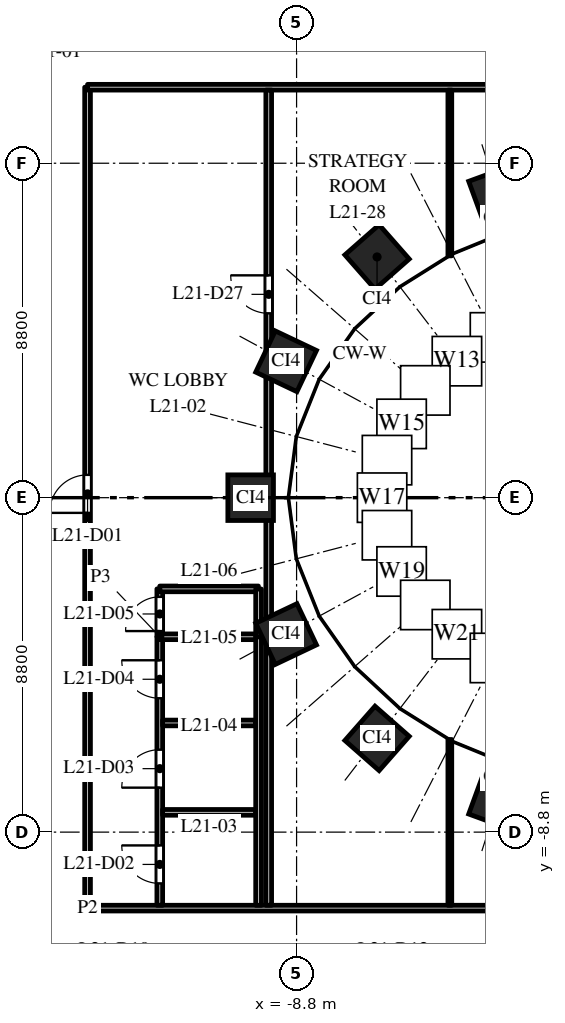
"""IFC4 building model, lengths in metres.
Left out: names, types, materials, properties, quantities, classifications, styles, units other than length and angle.
Written with IfcOpenShell. Run it as: python <this file> out.ifc"""

import sys

from ifc_helpers import new_model, si_unit, direction, frame, frame_2d, origin, origin_2d, place, context, subcontext, project, spatial, rectangle, extrude, element, fill, save


model = new_model("IFC4")
c1 = context("Model", 3, precision=1e-05, world=origin(), true_north=direction((0.0, 1.0)))
c2 = subcontext(c1, "Body", "Model", "MODEL_VIEW")
j1 = project(units=[si_unit("LENGTHUNIT", "METRE"), si_unit("PLANEANGLEUNIT", "RADIAN")], contexts=[c1])
p1 = place(None, origin())
s1 = spatial("IfcSite", under=j1, at=p1, CompositionType="ELEMENT")
p2 = place(p1, origin())
s2 = spatial("IfcBuilding", under=s1, at=p2, CompositionType="ELEMENT")
p3 = place(p2, frame((0.0, 0.0, 96.0)))
s3 = spatial("IfcBuildingStorey", under=s2, at=p3, CompositionType="ELEMENT", Elevation=96.0)
for number, where, z_axis, x_axis in (
    (1, (-3.501, 7.967, 0.0), (0.0, 0.0, 1.0), (-0.939, -0.344, 0.0)),
    (2, (-6.682, 6.334, 0.0), (0.0, 0.0, 1.0), (-0.751, -0.66, 0.0)),
    (3, (-9.076, 3.588, 0.0), (0.0, 0.0, 1.0), (-0.429, -0.903, 0.0)),
    (4, (-10.008, 0.0, 0.0), (0.0, 0.0, 1.0), (0.0, -1.0, 0.0)),
    (5, (-9.076, -3.588, 0.0), (0.0, 0.0, 1.0), (0.429, -0.903, 0.0)),
    (6, (-6.682, -6.334, 0.0), (0.0, 0.0, 1.0), (0.751, -0.66, 0.0)),
    (7, (-3.501, -7.967, 0.0), (0.0, 0.0, 1.0), (0.939, -0.344, 0.0)),
):
    element("IfcColumn", number, at=place(p3, frame(where, z_axis=z_axis, x_axis=x_axis)), inside=s3, PredefinedType="COLUMN", context=c2, shape_type="SweptSolid", body=[
        extrude(rectangle(XDim=1.2, YDim=1.2, at=origin_2d()), origin(), (0.0, 0.0, 1.0), 4.0),
    ])
p4 = place(p3, frame((-14.3, -10.8, 0.0), z_axis=(0.0, 0.0, 1.0), x_axis=(0.0, 1.0, 0.0)))
e8 = element("IfcWall", 8, at=p4, inside=s3, PredefinedType="PARTITIONING", context=c2, shape_type="SweptSolid", body=[
    extrude(rectangle(XDim=21.6, YDim=0.15, at=frame_2d((10.8, 0.0))), origin(), (0.0, 0.0, 1.0), 2.75),
])
p5 = place(p4, frame((10.4, 0.0, 0.0)))
e9 = element("IfcOpeningElement", 9, at=p5, cuts=e8, PredefinedType="OPENING", context=c2, shape_type="SweptSolid", body=[
    extrude(rectangle(XDim=1.0, YDim=2.1, at=frame_2d((0.5, 1.05))), frame((0.0, 0.085, 0.0), z_axis=(0.0, -1.0, 0.0), x_axis=(1.0, 0.0, 0.0)), (0.0, 0.0, 1.0), 0.17),
])
p6 = place(p3, frame((-14.3, -10.8, 0.0), z_axis=(0.0, 0.0, 1.0), x_axis=(1.0, 0.0, 0.0)))
e10 = element("IfcWall", 10, at=p6, inside=s3, PredefinedType="PARTITIONING", context=c2, shape_type="SweptSolid", body=[
    extrude(rectangle(XDim=28.6, YDim=0.15, at=frame_2d((14.3, 0.0))), origin(), (0.0, 0.0, 1.0), 2.85),
])
p7 = place(p6, frame((11.4, 0.0, 0.0)))
e11 = element("IfcOpeningElement", 11, at=p7, cuts=e10, PredefinedType="OPENING", context=c2, shape_type="SweptSolid", body=[
    extrude(rectangle(XDim=1.0, YDim=2.1, at=frame_2d((0.5, 1.05))), frame((0.0, 0.085, 0.0), z_axis=(0.0, -1.0, 0.0), x_axis=(1.0, 0.0, 0.0)), (0.0, 0.0, 1.0), 0.17),
])
p8 = place(p6, frame((16.167, 0.0, 0.0)))
e12 = element("IfcOpeningElement", 12, at=p8, cuts=e10, PredefinedType="OPENING", context=c2, shape_type="SweptSolid", body=[
    extrude(rectangle(XDim=1.0, YDim=2.1, at=frame_2d((0.5, 1.05))), frame((0.0, 0.085, 0.0), z_axis=(0.0, -1.0, 0.0), x_axis=(1.0, 0.0, 0.0)), (0.0, 0.0, 1.0), 0.17),
])
p9 = place(p3, frame((-14.3, 10.8, 0.0), z_axis=(0.0, 0.0, 1.0), x_axis=(1.0, 0.0, 0.0)))
e13 = element("IfcWall", 13, at=p9, inside=s3, PredefinedType="PARTITIONING", context=c2, shape_type="SweptSolid", body=[
    extrude(rectangle(XDim=28.6, YDim=0.15, at=frame_2d((14.3, 0.0))), origin(), (0.0, 0.0, 1.0), 2.85),
])
p10 = place(p9, frame((11.433, 0.0, 0.0)))
e14 = element("IfcOpeningElement", 14, at=p10, cuts=e13, PredefinedType="OPENING", context=c2, shape_type="SweptSolid", body=[
    extrude(rectangle(XDim=1.0, YDim=2.1, at=frame_2d((0.5, 1.05))), frame((0.0, 0.085, 0.0), z_axis=(0.0, -1.0, 0.0), x_axis=(1.0, 0.0, 0.0)), (0.0, 0.0, 1.0), 0.17),
])
p11 = place(p9, frame((16.2, 0.0, 0.0)))
e15 = element("IfcOpeningElement", 15, at=p11, cuts=e13, PredefinedType="OPENING", context=c2, shape_type="SweptSolid", body=[
    extrude(rectangle(XDim=1.0, YDim=2.1, at=frame_2d((0.5, 1.05))), frame((0.0, 0.085, 0.0), z_axis=(0.0, -1.0, 0.0), x_axis=(1.0, 0.0, 0.0)), (0.0, 0.0, 1.0), 0.17),
])
p12 = place(p9, frame((20.967, 0.0, 0.0)))
e16 = element("IfcOpeningElement", 16, at=p12, cuts=e13, PredefinedType="OPENING", context=c2, shape_type="SweptSolid", body=[
    extrude(rectangle(XDim=1.0, YDim=2.1, at=frame_2d((0.5, 1.05))), frame((0.0, 0.085, 0.0), z_axis=(0.0, -1.0, 0.0), x_axis=(1.0, 0.0, 0.0)), (0.0, 0.0, 1.0), 0.17),
])
p13 = place(p3, frame((-12.4, -10.725, 0.0), z_axis=(0.0, 0.0, 1.0), x_axis=(0.0, 1.0, 0.0)))
e17 = element("IfcWall", 17, at=p13, inside=s3, PredefinedType="PARTITIONING", context=c2, shape_type="SweptSolid", body=[
    extrude(rectangle(XDim=7.065, YDim=0.15, at=frame_2d((3.533, 0.0))), origin(), (0.0, 0.0, 1.0), 2.75),
])
p14 = place(p13, frame((0.575, 0.0, 0.0)))
e18 = element("IfcOpeningElement", 18, at=p14, cuts=e17, PredefinedType="OPENING", context=c2, shape_type="SweptSolid", body=[
    extrude(rectangle(XDim=1.0, YDim=2.1, at=frame_2d((0.5, 1.05))), frame((0.0, 0.085, 0.0), z_axis=(0.0, -1.0, 0.0), x_axis=(1.0, 0.0, 0.0)), (0.0, 0.0, 1.0), 0.17),
])
p15 = place(p13, frame((3.095, 0.0, 0.0)))
e19 = element("IfcOpeningElement", 19, at=p15, cuts=e17, PredefinedType="OPENING", context=c2, shape_type="SweptSolid", body=[
    extrude(rectangle(XDim=1.0, YDim=2.1, at=frame_2d((0.5, 1.05))), frame((0.0, 0.085, 0.0), z_axis=(0.0, -1.0, 0.0), x_axis=(1.0, 0.0, 0.0)), (0.0, 0.0, 1.0), 0.17),
])
p16 = place(p13, frame((5.447, 0.0, 0.0)))
e20 = element("IfcOpeningElement", 20, at=p16, cuts=e17, PredefinedType="OPENING", context=c2, shape_type="SweptSolid", body=[
    extrude(rectangle(XDim=1.0, YDim=2.1, at=frame_2d((0.5, 1.05))), frame((0.0, 0.085, 0.0), z_axis=(0.0, -1.0, 0.0), x_axis=(1.0, 0.0, 0.0)), (0.0, 0.0, 1.0), 0.17),
])
p17 = place(p3, frame((-12.325, -8.28, 0.0), z_axis=(0.0, 0.0, 1.0), x_axis=(1.0, 0.0, 0.0)))
e21 = element("IfcWall", 21, at=p17, inside=s3, PredefinedType="PARTITIONING", context=c2, shape_type="SweptSolid", body=[
    extrude(rectangle(XDim=2.45, YDim=0.15, at=frame_2d((1.225, 0.0))), origin(), (0.0, 0.0, 1.0), 2.75),
])
p18 = place(p3, frame((-12.325, -5.928, 0.0), z_axis=(0.0, 0.0, 1.0), x_axis=(1.0, 0.0, 0.0)))
e22 = element("IfcWall", 22, at=p18, inside=s3, PredefinedType="PARTITIONING", context=c2, shape_type="SweptSolid", body=[
    extrude(rectangle(XDim=2.45, YDim=0.15, at=frame_2d((1.225, 0.0))), origin(), (0.0, 0.0, 1.0), 3.7),
])
p19 = place(p3, frame((-12.4, -3.66, 0.0), z_axis=(0.0, 0.0, 1.0), x_axis=(0.0, 1.0, 0.0)))
e23 = element("IfcWall", 23, at=p19, inside=s3, PredefinedType="PARTITIONING", context=c2, shape_type="SweptSolid", body=[
    extrude(rectangle(XDim=1.26, YDim=0.15, at=frame_2d((0.63, 0.0))), origin(), (0.0, 0.0, 1.0), 3.7),
])
p20 = place(p19, frame((0.15, 0.0, 0.0)))
e24 = element("IfcOpeningElement", 24, at=p20, cuts=e23, PredefinedType="OPENING", context=c2, shape_type="SweptSolid", body=[
    extrude(rectangle(XDim=0.9, YDim=2.1, at=frame_2d((0.45, 1.05))), frame((0.0, 0.085, 0.0), z_axis=(0.0, -1.0, 0.0), x_axis=(1.0, 0.0, 0.0)), (0.0, 0.0, 1.0), 0.17),
])
p21 = place(p3, frame((-12.4, -3.66, 0.0), z_axis=(0.0, 0.0, 1.0), x_axis=(1.0, 0.0, 0.0)))
e25 = element("IfcWall", 25, at=p21, inside=s3, PredefinedType="PARTITIONING", context=c2, shape_type="SweptSolid", body=[
    extrude(rectangle(XDim=2.6, YDim=0.15, at=frame_2d((1.3, 0.0))), origin(), (0.0, 0.0, 1.0), 3.7),
])
p22 = place(p3, frame((-12.4, -2.4, 0.0), z_axis=(0.0, 0.0, 1.0), x_axis=(1.0, 0.0, 0.0)))
e26 = element("IfcWall", 26, at=p22, inside=s3, PredefinedType="PARTITIONING", context=c2, shape_type="SweptSolid", body=[
    extrude(rectangle(XDim=2.596, YDim=0.15, at=frame_2d((1.298, 0.0))), origin(), (0.0, 0.0, 1.0), 3.7),
])
p23 = place(p3, frame((-9.8, -10.725, 0.0), z_axis=(0.0, 0.0, 1.0), x_axis=(0.0, 1.0, 0.0)))
e27 = element("IfcWall", 27, at=p23, inside=s3, PredefinedType="PARTITIONING", context=c2, shape_type="SweptSolid", body=[
    extrude(rectangle(XDim=7.065, YDim=0.15, at=frame_2d((3.533, 0.0))), origin(), (0.0, 0.0, 1.0), 2.75),
])
p24 = place(p3, frame((-9.8, -3.66, 0.0), z_axis=(0.0, 0.0, 1.0), x_axis=(0.0, 1.0, 0.0)))
e28 = element("IfcWall", 28, at=p24, inside=s3, PredefinedType="PARTITIONING", context=c2, shape_type="SweptSolid", body=[
    extrude(rectangle(XDim=1.256, YDim=0.15, at=frame_2d((0.628, 0.0))), origin(), (0.0, 0.0, 1.0), 3.7),
])
p25 = place(p3, frame((-9.533, -10.725, 0.0), z_axis=(0.0, 0.0, 1.0), x_axis=(0.0, 1.0, 0.0)))
e29 = element("IfcWall", 29, at=p25, inside=s3, PredefinedType="PARTITIONING", context=c2, shape_type="SweptSolid", body=[
    extrude(rectangle(XDim=21.45, YDim=0.15, at=frame_2d((10.725, 0.0))), origin(), (0.0, 0.0, 1.0), 2.75),
])
p26 = place(p25, frame((15.575, 0.0, 0.0)))
e30 = element("IfcOpeningElement", 30, at=p26, cuts=e29, PredefinedType="OPENING", context=c2, shape_type="SweptSolid", body=[
    extrude(rectangle(XDim=1.0, YDim=2.1, at=frame_2d((0.5, 1.05))), frame((0.0, 0.085, 0.0), z_axis=(0.0, -1.0, 0.0), x_axis=(1.0, 0.0, 0.0)), (0.0, 0.0, 1.0), 0.17),
])
for number, where, z_axis, x_axis in (
    (31, (-4.767, -10.725, 0.0), (0.0, 0.0, 1.0), (0.0, 1.0, 0.0)),
    (32, (-4.767, 6.363, 0.0), (0.0, 0.0, 1.0), (0.0, 1.0, 0.0)),
):
    element("IfcWall", number, at=place(p3, frame(where, z_axis=z_axis, x_axis=x_axis)), inside=s3, PredefinedType="PARTITIONING", context=c2, shape_type="SweptSolid", body=[
        extrude(rectangle(XDim=4.362, YDim=0.1, at=frame_2d((2.181, 0.0))), origin(), (0.0, 0.0, 1.0), 2.9),
    ])
p27 = place(p5, origin())
e33 = element("IfcDoor", 33, at=p27, inside=s3, OperationType="SINGLE_SWING_LEFT", PredefinedType="DOOR", context=c2, shape_type="SweptSolid", body=[
    extrude(rectangle(XDim=1.0, YDim=2.1, at=frame_2d((0.5, 1.05))), frame((0.0, 0.025, 0.0), z_axis=(0.0, -1.0, 0.0), x_axis=(1.0, 0.0, 0.0)), (0.0, 0.0, 1.0), 0.05),
])
fill(e9, e33)
p28 = place(p14, origin())
e34 = element("IfcDoor", 34, at=p28, inside=s3, OperationType="SINGLE_SWING_RIGHT", PredefinedType="DOOR", context=c2, shape_type="SweptSolid", body=[
    extrude(rectangle(XDim=1.0, YDim=2.1, at=frame_2d((0.5, 1.05))), frame((0.0, 0.025, 0.0), z_axis=(0.0, -1.0, 0.0), x_axis=(1.0, 0.0, 0.0)), (0.0, 0.0, 1.0), 0.05),
])
fill(e18, e34)
p29 = place(p15, origin())
e35 = element("IfcDoor", 35, at=p29, inside=s3, OperationType="SINGLE_SWING_LEFT", PredefinedType="DOOR", context=c2, shape_type="SweptSolid", body=[
    extrude(rectangle(XDim=1.0, YDim=2.1, at=frame_2d((0.5, 1.05))), frame((0.0, 0.025, 0.0), z_axis=(0.0, -1.0, 0.0), x_axis=(1.0, 0.0, 0.0)), (0.0, 0.0, 1.0), 0.05),
])
fill(e19, e35)
p30 = place(p16, origin())
e36 = element("IfcDoor", 36, at=p30, inside=s3, OperationType="SINGLE_SWING_RIGHT", PredefinedType="DOOR", context=c2, shape_type="SweptSolid", body=[
    extrude(rectangle(XDim=1.0, YDim=2.1, at=frame_2d((0.5, 1.05))), frame((0.0, 0.025, 0.0), z_axis=(0.0, -1.0, 0.0), x_axis=(1.0, 0.0, 0.0)), (0.0, 0.0, 1.0), 0.05),
])
fill(e20, e36)
p31 = place(p20, origin())
e37 = element("IfcDoor", 37, at=p31, inside=s3, OperationType="SINGLE_SWING_LEFT", PredefinedType="DOOR", context=c2, shape_type="SweptSolid", body=[
    extrude(rectangle(XDim=0.9, YDim=2.1, at=frame_2d((0.45, 1.05))), frame((0.0, 0.025, 0.0), z_axis=(0.0, -1.0, 0.0), x_axis=(1.0, 0.0, 0.0)), (0.0, 0.0, 1.0), 0.05),
])
fill(e24, e37)
p32 = place(p26, origin())
e38 = element("IfcDoor", 38, at=p32, inside=s3, OperationType="SINGLE_SWING_RIGHT", PredefinedType="DOOR", context=c2, shape_type="SweptSolid", body=[
    extrude(rectangle(XDim=1.0, YDim=2.1, at=frame_2d((0.5, 1.05))), frame((0.0, 0.025, 0.0), z_axis=(0.0, -1.0, 0.0), x_axis=(1.0, 0.0, 0.0)), (0.0, 0.0, 1.0), 0.05),
])
fill(e30, e38)
save(model, sys.argv[1])
